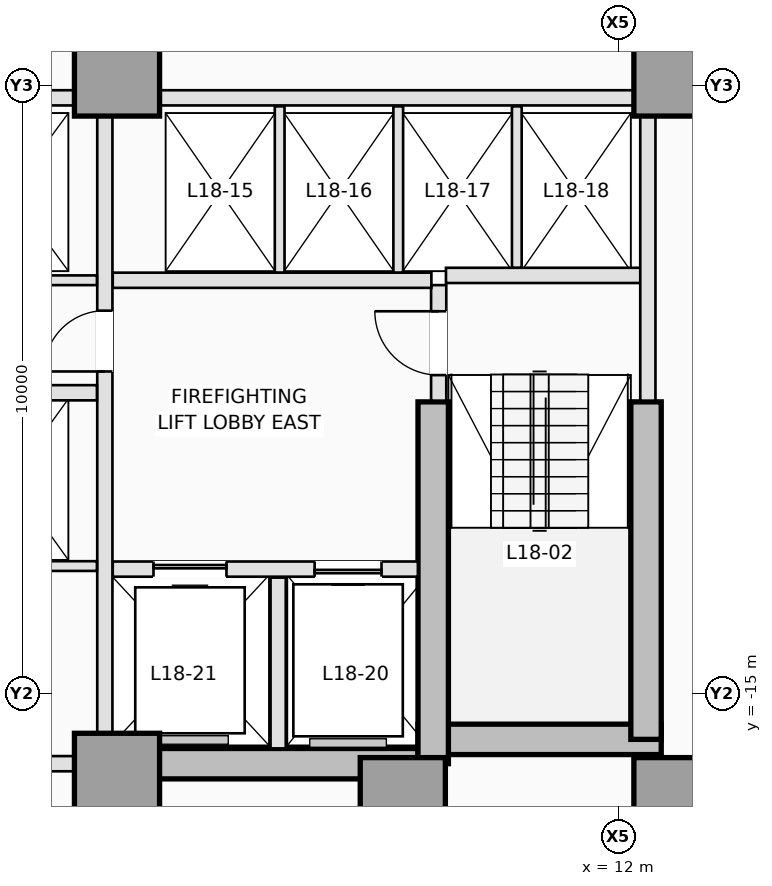
"""IFC4 building model, lengths in metres.
Left out: names, types, materials, properties, quantities, classifications, styles, units other than length and angle.
Written with IfcOpenShell. Run it as: python <this file> out.ifc"""

import sys

from ifc_helpers import new_model, si_unit, direction, frame, frame_2d, origin, origin_2d, place, context, subcontext, project, spatial, rectangle, extrude, element, fill, save


model = new_model("IFC4")
c1 = context("Model", 3, precision=1e-05, world=origin(), true_north=direction((0.0, 1.0)))
c2 = subcontext(c1, "Body", "Model", "MODEL_VIEW")
j1 = project(units=[si_unit("LENGTHUNIT", "METRE"), si_unit("PLANEANGLEUNIT", "RADIAN")], contexts=[c1])
p1 = place(None, origin())
s1 = spatial("IfcSite", under=j1, at=p1, CompositionType="ELEMENT")
p2 = place(p1, origin())
s2 = spatial("IfcBuilding", under=s1, at=p2, CompositionType="ELEMENT")
p3 = place(p2, frame((0.0, 0.0, 69.6)))
s3 = spatial("IfcBuildingStorey", under=s2, at=p3, CompositionType="ELEMENT", Elevation=69.6)
p4 = place(p3, frame((3.75, -16.15, 0.0), z_axis=(0.0, 0.0, 1.0), x_axis=(1.0, 0.0, 0.0)))
e1 = element("IfcWall", 1, at=p4, inside=s3, PredefinedType="SHEAR", context=c2, shape_type="SweptSolid", body=[
    extrude(rectangle(XDim=5.2, YDim=0.5, at=frame_2d((2.6, 0.0))), origin(), (0.0, 0.0, 1.0), 3.5),
])
p5 = place(p3, frame((8.7, -15.75, 0.0), z_axis=(0.0, 0.0, 1.0), x_axis=(1.0, 0.0, 0.0)))
e2 = element("IfcWall", 2, at=p5, inside=s3, PredefinedType="SHEAR", context=c2, shape_type="SweptSolid", body=[
    extrude(rectangle(XDim=4.0, YDim=0.5, at=frame_2d((2.0, 0.0))), origin(), (0.0, 0.0, 1.0), 3.5),
])
p6 = place(p3, frame((12.45, -15.75, 0.0), z_axis=(0.0, 0.0, 1.0), x_axis=(0.0, 1.0, 0.0)))
e3 = element("IfcWall", 3, at=p6, inside=s3, PredefinedType="SHEAR", context=c2, shape_type="SweptSolid", body=[
    extrude(rectangle(XDim=5.55, YDim=0.5, at=frame_2d((2.775, 0.0))), origin(), (0.0, 0.0, 1.0), 3.5),
])
p7 = place(p3, frame((8.95, -16.15, 0.0), z_axis=(0.0, 0.0, 1.0), x_axis=(0.0, 1.0, 0.0)))
e4 = element("IfcWall", 4, at=p7, inside=s3, PredefinedType="SHEAR", context=c2, shape_type="SweptSolid", body=[
    extrude(rectangle(XDim=5.95, YDim=0.5, at=frame_2d((2.975, 0.0))), origin(), (0.0, 0.0, 1.0), 3.5),
])
for number, where, z_axis, x_axis in (
    (5, (3.75, -16.35, 0.0), (0.0, 0.0, 1.0), (1.0, 0.0, 0.0)),
    (6, (8.45, -16.75, 0.0), (0.0, 0.0, 1.0), (1.0, 0.0, 0.0)),
    (7, (12.95, -16.75, 0.0), (0.0, 0.0, 1.0), (1.0, 0.0, 0.0)),
    (8, (3.75, -4.8, 0.0), (0.0, 0.0, 1.0), (1.0, 0.0, 0.0)),
    (9, (12.95, -4.8, 0.0), (0.0, 0.0, 1.0), (1.0, 0.0, 0.0)),
):
    element("IfcColumn", number, at=place(p3, frame(where, z_axis=z_axis, x_axis=x_axis)), inside=s3, PredefinedType="COLUMN", context=c2, shape_type="SweptSolid", body=[
        extrude(rectangle(XDim=1.4, YDim=1.4, at=origin_2d()), origin(), (0.0, 0.0, 1.0), 3.5),
    ])
p8 = place(p3, frame((9.04, -10.18, 0.0), z_axis=(0.0, 0.0, 1.0), x_axis=(0.0, 1.0, 0.0)))
e10 = element("IfcWall", 10, at=p8, inside=s3, PredefinedType="PARTITIONING", context=c2, shape_type="SweptSolid", body=[
    extrude(rectangle(XDim=1.9, YDim=0.25, at=frame_2d((0.95, 0.0))), origin(), (0.0, 0.0, 1.0), 3.25),
])
p9 = place(p8, frame((0.42, 0.0, 0.0)))
e11 = element("IfcOpeningElement", 11, at=p9, cuts=e10, PredefinedType="OPENING", context=c2, shape_type="SweptSolid", body=[
    extrude(rectangle(XDim=1.05, YDim=2.15, at=frame_2d((0.525, 1.075))), frame((0.0, 0.135, 0.0), z_axis=(0.0, -1.0, 0.0), x_axis=(1.0, 0.0, 0.0)), (0.0, 0.0, 1.0), 0.27),
])
p10 = place(p3, frame((9.16, -8.12, 0.0), z_axis=(0.0, 0.0, 1.0), x_axis=(1.0, 0.0, 0.0)))
e12 = element("IfcWall", 12, at=p10, inside=s3, PredefinedType="PARTITIONING", context=c2, shape_type="SweptSolid", body=[
    extrude(rectangle(XDim=3.22, YDim=0.25, at=frame_2d((1.61, 0.0))), origin(), (0.0, 0.0, 1.0), 3.25),
])
p11 = place(p3, frame((12.48, -10.18, 0.0), z_axis=(0.0, 0.0, 1.0), x_axis=(0.0, 1.0, 0.0)))
e13 = element("IfcWall", 13, at=p11, inside=s3, PredefinedType="PARTITIONING", context=c2, shape_type="SweptSolid", body=[
    extrude(rectangle(XDim=4.678, YDim=0.25, at=frame_2d((2.339, 0.0))), origin(), (0.0, 0.0, 1.0), 3.25),
])
p12 = place(p3, frame((3.68, -12.95, 0.0), z_axis=(0.0, 0.0, 1.0), x_axis=(1.0, 0.0, 0.0)))
e14 = element("IfcWall", 14, at=p12, inside=s3, PredefinedType="PARTITIONING", context=c2, shape_type="SweptSolid", body=[
    extrude(rectangle(XDim=5.018, YDim=0.25, at=frame_2d((2.509, 0.0))), origin(), (0.0, 0.0, 1.0), 3.25),
])
p13 = place(p12, frame((3.32, 0.0, 0.0)))
e15 = element("IfcOpeningElement", 15, at=p13, cuts=e14, PredefinedType="OPENING", context=c2, shape_type="SweptSolid", body=[
    extrude(rectangle(XDim=1.1, YDim=2.15, at=frame_2d((0.55, 1.075))), frame((0.0, 0.135, 0.0), z_axis=(0.0, -1.0, 0.0), x_axis=(1.0, 0.0, 0.0)), (0.0, 0.0, 1.0), 0.27),
])
p14 = place(p12, frame((0.67, 0.0, 0.0)))
e16 = element("IfcOpeningElement", 16, at=p14, cuts=e14, PredefinedType="OPENING", context=c2, shape_type="SweptSolid", body=[
    extrude(rectangle(XDim=1.2, YDim=2.15, at=frame_2d((0.6, 1.075))), frame((0.0, 0.135, 0.0), z_axis=(0.0, -1.0, 0.0), x_axis=(1.0, 0.0, 0.0)), (0.0, 0.0, 1.0), 0.27),
])
p15 = place(p3, frame((6.4, -15.898, 0.0), z_axis=(0.0, 0.0, 1.0), x_axis=(0.0, 1.0, 0.0)))
e17 = element("IfcWall", 17, at=p15, inside=s3, PredefinedType="PARTITIONING", context=c2, shape_type="SweptSolid", body=[
    extrude(rectangle(XDim=2.808, YDim=0.25, at=frame_2d((1.404, 0.0))), origin(), (0.0, 0.0, 1.0), 3.25),
])
p16 = place(p3, frame((3.68, -8.2, 0.0), z_axis=(0.0, 0.0, 1.0), x_axis=(1.0, 0.0, 0.0)))
e18 = element("IfcWall", 18, at=p16, inside=s3, PredefinedType="PARTITIONING", context=c2, shape_type="SweptSolid", body=[
    extrude(rectangle(XDim=5.24, YDim=0.25, at=frame_2d((2.62, 0.0))), origin(), (0.0, 0.0, 1.0), 3.25),
])
p17 = place(p3, frame((3.55, -15.648, 0.0), z_axis=(0.0, 0.0, 1.0), x_axis=(0.0, 1.0, 0.0)))
e19 = element("IfcWall", 19, at=p17, inside=s3, PredefinedType="PARTITIONING", context=c2, shape_type="SweptSolid", body=[
    extrude(rectangle(XDim=10.146, YDim=0.25, at=frame_2d((5.073, 0.0))), origin(), (0.0, 0.0, 1.0), 3.25),
])
p18 = place(p17, frame((5.948, 0.0, 0.0)))
e20 = element("IfcOpeningElement", 20, at=p18, cuts=e19, PredefinedType="OPENING", context=c2, shape_type="SweptSolid", body=[
    extrude(rectangle(XDim=1.0, YDim=2.15, at=frame_2d((0.5, 1.075))), frame((0.0, 0.135, 0.0), z_axis=(0.0, -1.0, 0.0), x_axis=(1.0, 0.0, 0.0)), (0.0, 0.0, 1.0), 0.27),
])
p19 = place(p3, frame((4.452, -5.2, 0.0), z_axis=(0.0, 0.0, 1.0), x_axis=(1.0, 0.0, 0.0)))
e21 = element("IfcWall", 21, at=p19, inside=s3, PredefinedType="PARTITIONING", context=c2, shape_type="SweptSolid", body=[
    extrude(rectangle(XDim=7.796, YDim=0.25, at=frame_2d((3.898, 0.0))), origin(), (0.0, 0.0, 1.0), 3.25),
])
p20 = place(p3, frame((0.95, -5.2, 0.0), z_axis=(0.0, 0.0, 1.0), x_axis=(1.0, 0.0, 0.0)))
e22 = element("IfcWall", 22, at=p20, inside=s3, PredefinedType="PARTITIONING", context=c2, shape_type="SweptSolid", body=[
    extrude(rectangle(XDim=2.098, YDim=0.25, at=frame_2d((1.049, 0.0))), origin(), (0.0, 0.0, 1.0), 3.25),
])
for number, where, z_axis, x_axis in (
    (23, (6.425, -8.073, 0.0), (0.0, 0.0, 1.0), (0.0, 1.0, 0.0)),
    (24, (8.375, -8.073, 0.0), (0.0, 0.0, 1.0), (0.0, 1.0, 0.0)),
):
    element("IfcWall", number, at=place(p3, frame(where, z_axis=z_axis, x_axis=x_axis)), inside=s3, PredefinedType="PARTITIONING", context=c2, shape_type="SweptSolid", body=[
        extrude(rectangle(XDim=2.733, YDim=0.16, at=frame_2d((1.366, 0.0))), origin(), (0.0, 0.0, 1.0), 3.25),
    ])
p21 = place(p3, frame((10.325, -7.993, 0.0), z_axis=(0.0, 0.0, 1.0), x_axis=(0.0, 1.0, 0.0)))
e25 = element("IfcWall", 25, at=p21, inside=s3, PredefinedType="PARTITIONING", context=c2, shape_type="SweptSolid", body=[
    extrude(rectangle(XDim=2.653, YDim=0.16, at=frame_2d((1.326, 0.0))), origin(), (0.0, 0.0, 1.0), 3.25),
])
p22 = place(p3, frame((-3.048, -16.15, 0.0), z_axis=(0.0, 0.0, 1.0), x_axis=(1.0, 0.0, 0.0)))
e26 = element("IfcWall", 26, at=p22, inside=s3, PredefinedType="PARTITIONING", context=c2, shape_type="SweptSolid", body=[
    extrude(rectangle(XDim=6.096, YDim=0.25, at=frame_2d((3.048, 0.0))), origin(), (0.0, 0.0, 1.0), 2.3),
])
p23 = place(p3, frame((0.95, -8.2, 0.0), z_axis=(0.0, 0.0, 1.0), x_axis=(1.0, 0.0, 0.0)))
e27 = element("IfcWall", 27, at=p23, inside=s3, PredefinedType="PARTITIONING", context=c2, shape_type="SweptSolid", body=[
    extrude(rectangle(XDim=2.47, YDim=0.16, at=frame_2d((1.235, 0.0))), origin(), (0.0, 0.0, 1.0), 3.25),
])
p24 = place(p3, frame((0.95, -10.05, 0.0), z_axis=(0.0, 0.0, 1.0), x_axis=(1.0, 0.0, 0.0)))
e28 = element("IfcWall", 28, at=p24, inside=s3, PredefinedType="PARTITIONING", context=c2, shape_type="SweptSolid", body=[
    extrude(rectangle(XDim=2.47, YDim=0.25, at=frame_2d((1.235, 0.0))), origin(), (0.0, 0.0, 1.0), 3.25),
])
p25 = place(p3, frame((-3.42, -12.9, 0.0), z_axis=(0.0, 0.0, 1.0), x_axis=(1.0, 0.0, 0.0)))
e29 = element("IfcWall", 29, at=p25, inside=s3, PredefinedType="PARTITIONING", context=c2, shape_type="SweptSolid", body=[
    extrude(rectangle(XDim=6.84, YDim=0.16, at=frame_2d((3.42, 0.0))), origin(), (0.0, 0.0, 1.0), 3.25),
])
p26 = place(p25, frame((2.98, 0.0, 0.0)))
e30 = element("IfcOpeningElement", 30, at=p26, cuts=e29, PredefinedType="OPENING", context=c2, shape_type="SweptSolid", body=[
    extrude(rectangle(XDim=0.88, YDim=2.12, at=frame_2d((0.44, 1.06))), frame((0.0, 0.09, 0.0), z_axis=(0.0, -1.0, 0.0), x_axis=(1.0, 0.0, 0.0)), (0.0, 0.0, 1.0), 0.18),
])
p27 = place(p13, origin())
e31 = element("IfcDoor", 31, at=p27, inside=s3, OperationType="SLIDING_TO_RIGHT", PredefinedType="DOOR", context=c2, shape_type="SweptSolid", body=[
    extrude(rectangle(XDim=1.1, YDim=2.15, at=frame_2d((0.55, 1.075))), frame((0.0, 0.025, 0.0), z_axis=(0.0, -1.0, 0.0), x_axis=(1.0, 0.0, 0.0)), (0.0, 0.0, 1.0), 0.05),
])
fill(e15, e31)
p28 = place(p14, origin())
e32 = element("IfcDoor", 32, at=p28, inside=s3, OperationType="SLIDING_TO_LEFT", PredefinedType="DOOR", context=c2, shape_type="SweptSolid", body=[
    extrude(rectangle(XDim=1.2, YDim=2.15, at=frame_2d((0.6, 1.075))), frame((0.0, 0.025, 0.0), z_axis=(0.0, -1.0, 0.0), x_axis=(1.0, 0.0, 0.0)), (0.0, 0.0, 1.0), 0.05),
])
fill(e16, e32)
p29 = place(p9, origin())
e33 = element("IfcDoor", 33, at=p29, inside=s3, OperationType="SINGLE_SWING_RIGHT", PredefinedType="DOOR", context=c2, shape_type="SweptSolid", body=[
    extrude(rectangle(XDim=1.05, YDim=2.15, at=frame_2d((0.525, 1.075))), frame((0.0, 0.025, 0.0), z_axis=(0.0, -1.0, 0.0), x_axis=(1.0, 0.0, 0.0)), (0.0, 0.0, 1.0), 0.05),
])
fill(e11, e33)
p30 = place(p18, origin())
e34 = element("IfcDoor", 34, at=p30, inside=s3, OperationType="SINGLE_SWING_LEFT", PredefinedType="DOOR", context=c2, shape_type="SweptSolid", body=[
    extrude(rectangle(XDim=1.0, YDim=2.15, at=frame_2d((0.5, 1.075))), frame((0.0, 0.025, 0.0), z_axis=(0.0, -1.0, 0.0), x_axis=(1.0, 0.0, 0.0)), (0.0, 0.0, 1.0), 0.05),
])
fill(e20, e34)
save(model, sys.argv[1])
